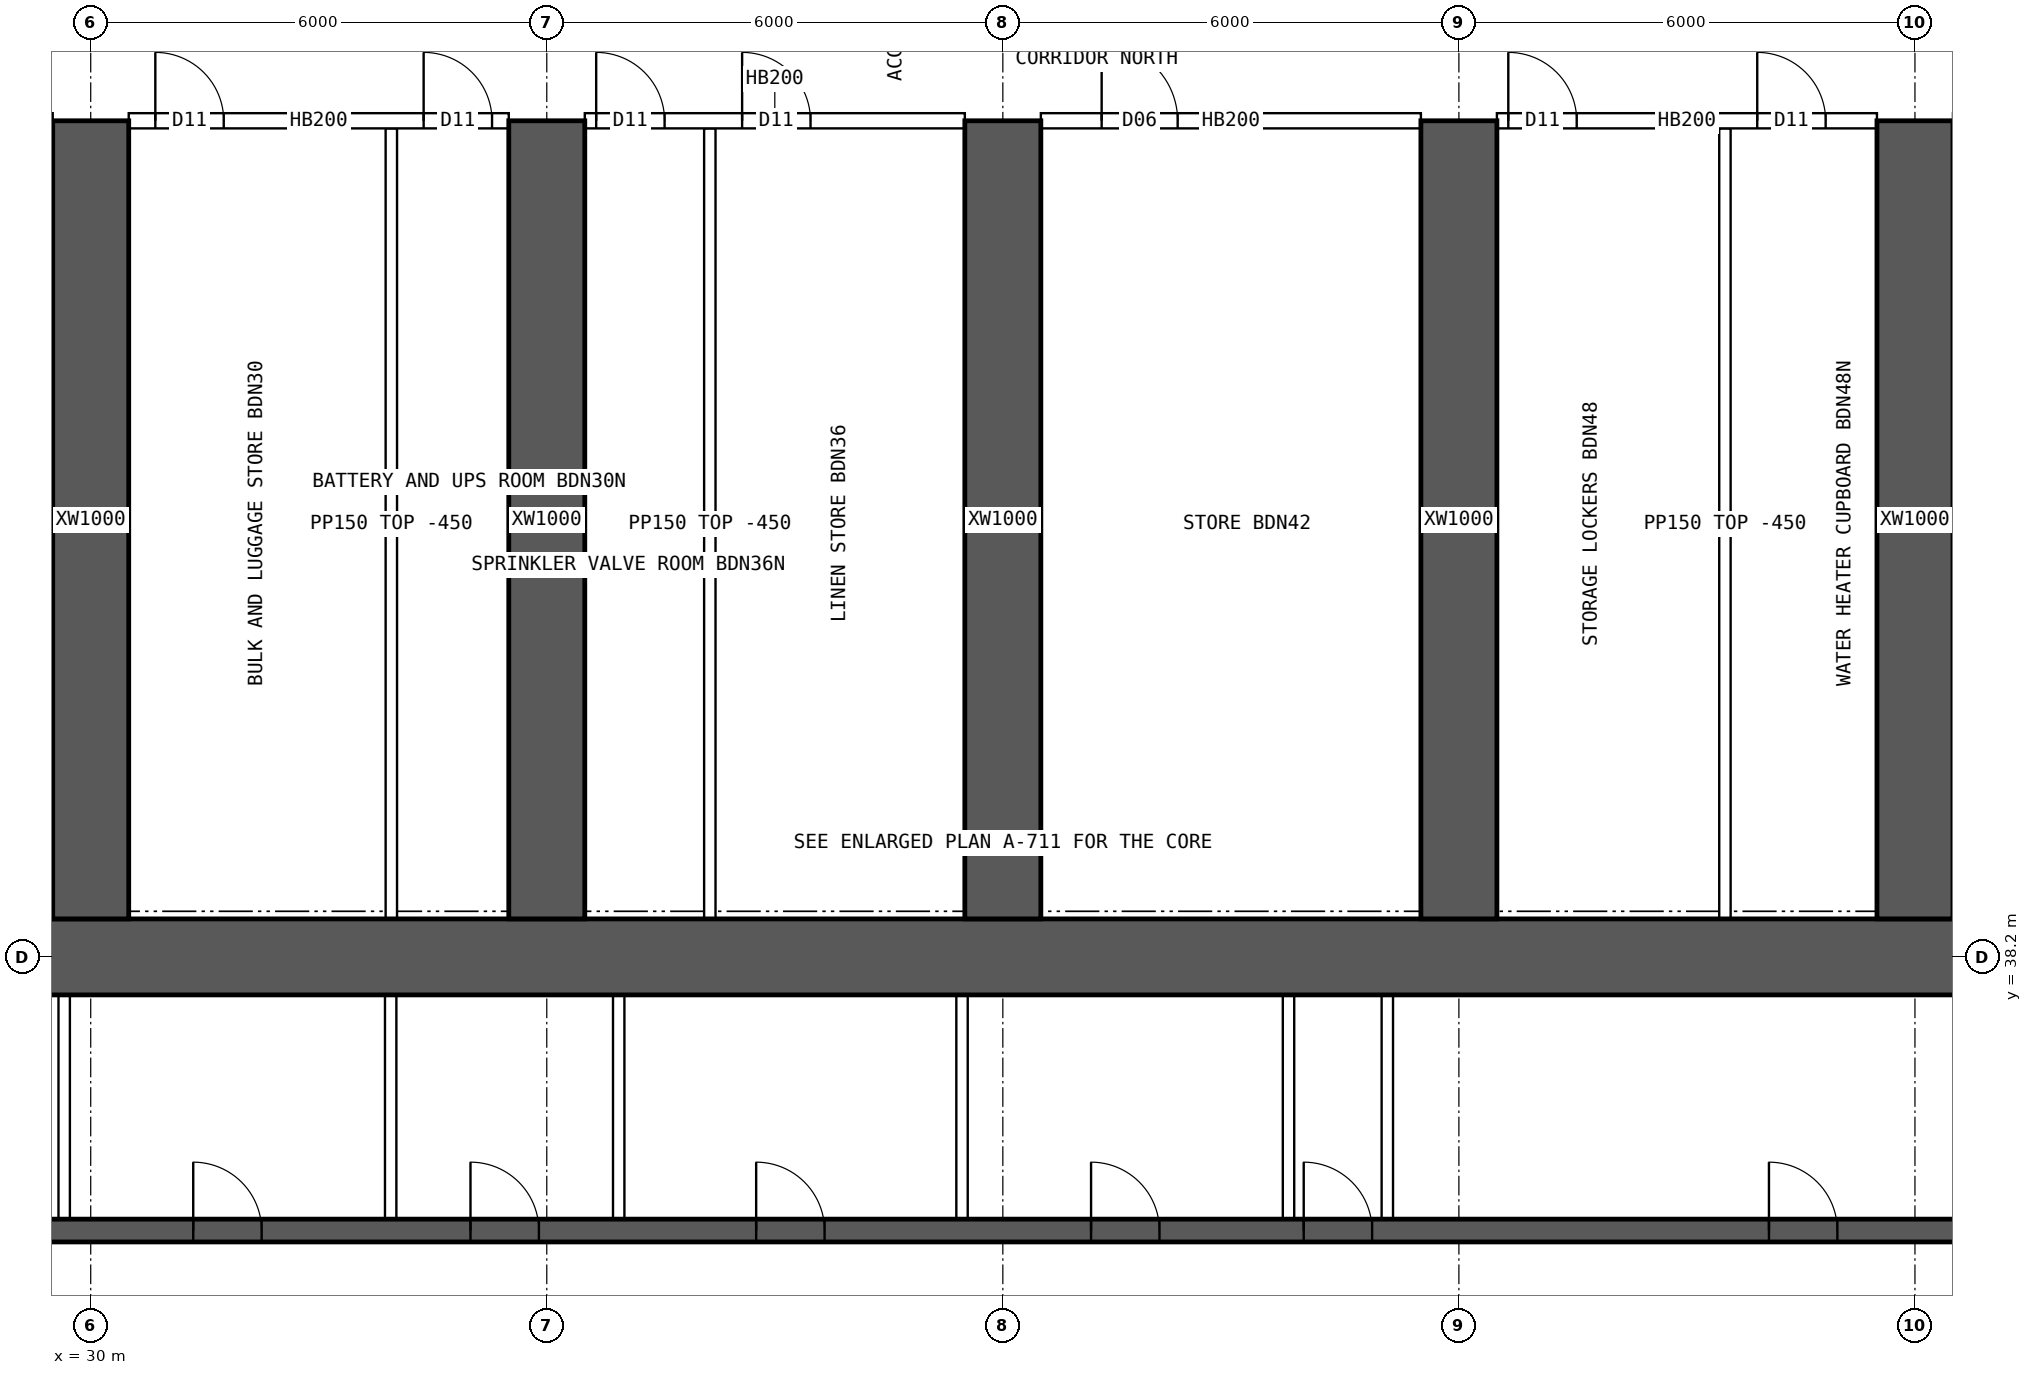
"""IFC4 building model, lengths in metres.
Left out: names, types, materials, properties, quantities, classifications, styles, units other than length and angle.
Written with IfcOpenShell. Run it as: python <this file> out.ifc"""

import sys

from ifc_helpers import new_model, si_unit, direction, frame, frame_2d, origin, place, context, subcontext, project, spatial, rectangle, extrude, element, fill, save


model = new_model("IFC4")
c1 = context("Model", 3, precision=1e-05, world=origin(), true_north=direction((0.0, 1.0)))
c2 = subcontext(c1, "Body", "Model", "MODEL_VIEW")
j1 = project(units=[si_unit("LENGTHUNIT", "METRE"), si_unit("PLANEANGLEUNIT", "RADIAN")], contexts=[c1])
p1 = place(None, origin())
s1 = spatial("IfcSite", under=j1, at=p1, CompositionType="ELEMENT")
p2 = place(p1, origin())
s2 = spatial("IfcBuilding", under=s1, at=p2, CompositionType="ELEMENT")
p3 = place(p2, frame((0.0, 0.0, 35.2)))
s3 = spatial("IfcBuildingStorey", under=s2, at=p3, CompositionType="ELEMENT", Elevation=35.2)
p4 = place(p3, frame((18.0, 38.2, 0.0), z_axis=(0.0, 0.0, 1.0), x_axis=(1.0, 0.0, 0.0)))
e1 = element("IfcWall", 1, at=p4, inside=s3, PredefinedType="SHEAR", context=c2, shape_type="SweptSolid", body=[
    extrude(rectangle(XDim=48.0, YDim=1.0, at=frame_2d((24.0, 0.0))), origin(), (0.0, 0.0, 1.0), 3.75),
])
p5 = place(p3, frame((18.5, 34.6, 0.0), z_axis=(0.0, 0.0, 1.0), x_axis=(1.0, 0.0, 0.0)))
e2 = element("IfcWall", 2, at=p5, inside=s3, PredefinedType="SHEAR", context=c2, shape_type="SweptSolid", body=[
    extrude(rectangle(XDim=47.0, YDim=0.3, at=frame_2d((23.5, 0.0))), origin(), (0.0, 0.0, 1.0), 3.75),
])
p6 = place(p5, frame((0.9, 0.0, 0.0)))
e3 = element("IfcOpeningElement", 3, at=p6, cuts=e2, PredefinedType="OPENING", context=c2, shape_type="SweptSolid", body=[
    extrude(rectangle(XDim=1.1, YDim=2.1, at=frame_2d((0.55, 1.05))), frame((0.0, 0.16, 0.0), z_axis=(0.0, -1.0, 0.0), x_axis=(1.0, 0.0, 0.0)), (0.0, 0.0, 1.0), 0.32),
])
p7 = place(p5, frame((45.0, 0.0, 0.0)))
e4 = element("IfcOpeningElement", 4, at=p7, cuts=e2, PredefinedType="OPENING", context=c2, shape_type="SweptSolid", body=[
    extrude(rectangle(XDim=1.1, YDim=2.1, at=frame_2d((0.55, 1.05))), frame((0.0, 0.16, 0.0), z_axis=(0.0, -1.0, 0.0), x_axis=(1.0, 0.0, 0.0)), (0.0, 0.0, 1.0), 0.32),
])
p8 = place(p5, frame((4.1, 0.0, 0.0)))
e5 = element("IfcOpeningElement", 5, at=p8, cuts=e2, PredefinedType="OPENING", context=c2, shape_type="SweptSolid", body=[
    extrude(rectangle(XDim=0.9, YDim=2.1, at=frame_2d((0.45, 1.05))), frame((0.0, 0.16, 0.0), z_axis=(0.0, -1.0, 0.0), x_axis=(1.0, 0.0, 0.0)), (0.0, 0.0, 1.0), 0.32),
])
p9 = place(p5, frame((42.0, 0.0, 0.0)))
e6 = element("IfcOpeningElement", 6, at=p9, cuts=e2, PredefinedType="OPENING", context=c2, shape_type="SweptSolid", body=[
    extrude(rectangle(XDim=0.9, YDim=2.1, at=frame_2d((0.45, 1.05))), frame((0.0, 0.16, 0.0), z_axis=(0.0, -1.0, 0.0), x_axis=(1.0, 0.0, 0.0)), (0.0, 0.0, 1.0), 0.32),
])
p10 = place(p5, frame((8.875, 0.0, 0.0)))
e7 = element("IfcOpeningElement", 7, at=p10, cuts=e2, PredefinedType="OPENING", context=c2, shape_type="SweptSolid", body=[
    extrude(rectangle(XDim=0.9, YDim=2.1, at=frame_2d((0.45, 1.05))), frame((0.0, 0.16, 0.0), z_axis=(0.0, -1.0, 0.0), x_axis=(1.0, 0.0, 0.0)), (0.0, 0.0, 1.0), 0.32),
])
p11 = place(p5, frame((12.849, 0.0, 0.0)))
e8 = element("IfcOpeningElement", 8, at=p11, cuts=e2, PredefinedType="OPENING", context=c2, shape_type="SweptSolid", body=[
    extrude(rectangle(XDim=0.9, YDim=2.1, at=frame_2d((0.45, 1.05))), frame((0.0, 0.16, 0.0), z_axis=(0.0, -1.0, 0.0), x_axis=(1.0, 0.0, 0.0)), (0.0, 0.0, 1.0), 0.32),
])
p12 = place(p5, frame((16.496, 0.0, 0.0)))
e9 = element("IfcOpeningElement", 9, at=p12, cuts=e2, PredefinedType="OPENING", context=c2, shape_type="SweptSolid", body=[
    extrude(rectangle(XDim=0.9, YDim=2.1, at=frame_2d((0.45, 1.05))), frame((0.0, 0.16, 0.0), z_axis=(0.0, -1.0, 0.0), x_axis=(1.0, 0.0, 0.0)), (0.0, 0.0, 1.0), 0.32),
])
p13 = place(p5, frame((20.255, 0.0, 0.0)))
e10 = element("IfcOpeningElement", 10, at=p13, cuts=e2, PredefinedType="OPENING", context=c2, shape_type="SweptSolid", body=[
    extrude(rectangle(XDim=0.9, YDim=2.1, at=frame_2d((0.45, 1.05))), frame((0.0, 0.16, 0.0), z_axis=(0.0, -1.0, 0.0), x_axis=(1.0, 0.0, 0.0)), (0.0, 0.0, 1.0), 0.32),
])
p14 = place(p5, frame((24.661, 0.0, 0.0)))
e11 = element("IfcOpeningElement", 11, at=p14, cuts=e2, PredefinedType="OPENING", context=c2, shape_type="SweptSolid", body=[
    extrude(rectangle(XDim=0.9, YDim=2.1, at=frame_2d((0.45, 1.05))), frame((0.0, 0.16, 0.0), z_axis=(0.0, -1.0, 0.0), x_axis=(1.0, 0.0, 0.0)), (0.0, 0.0, 1.0), 0.32),
])
p15 = place(p5, frame((27.458, 0.0, 0.0)))
e12 = element("IfcOpeningElement", 12, at=p15, cuts=e2, PredefinedType="OPENING", context=c2, shape_type="SweptSolid", body=[
    extrude(rectangle(XDim=0.9, YDim=2.1, at=frame_2d((0.45, 1.05))), frame((0.0, 0.16, 0.0), z_axis=(0.0, -1.0, 0.0), x_axis=(1.0, 0.0, 0.0)), (0.0, 0.0, 1.0), 0.32),
])
p16 = place(p5, frame((33.579, 0.0, 0.0)))
e13 = element("IfcOpeningElement", 13, at=p16, cuts=e2, PredefinedType="OPENING", context=c2, shape_type="SweptSolid", body=[
    extrude(rectangle(XDim=0.9, YDim=2.1, at=frame_2d((0.45, 1.05))), frame((0.0, 0.16, 0.0), z_axis=(0.0, -1.0, 0.0), x_axis=(1.0, 0.0, 0.0)), (0.0, 0.0, 1.0), 0.32),
])
for number, where, z_axis, x_axis in (
    (14, (30.0, 38.7, 0.0), (0.0, 0.0, 1.0), (0.0, 1.0, 0.0)),
    (15, (36.0, 38.7, 0.0), (0.0, 0.0, 1.0), (0.0, 1.0, 0.0)),
    (16, (42.0, 38.7, 0.0), (0.0, 0.0, 1.0), (0.0, 1.0, 0.0)),
    (17, (48.0, 38.7, 0.0), (0.0, 0.0, 1.0), (0.0, 1.0, 0.0)),
    (18, (54.0, 38.7, 0.0), (0.0, 0.0, 1.0), (0.0, 1.0, 0.0)),
):
    element("IfcWall", number, at=place(p3, frame(where, z_axis=z_axis, x_axis=x_axis)), inside=s3, PredefinedType="SHEAR", context=c2, shape_type="SweptSolid", body=[
        extrude(rectangle(XDim=10.5, YDim=1.0, at=frame_2d((5.25, 0.0))), origin(), (0.0, 0.0, 1.0), 3.75),
    ])
for number, where, z_axis, x_axis in (
    (19, (29.651, 34.75, 0.0), (0.0, 0.0, 1.0), (0.0, 1.0, 0.0)),
    (20, (33.946, 34.75, 0.0), (0.0, 0.0, 1.0), (0.0, 1.0, 0.0)),
    (21, (36.946, 34.75, 0.0), (0.0, 0.0, 1.0), (0.0, 1.0, 0.0)),
    (22, (41.463, 34.75, 0.0), (0.0, 0.0, 1.0), (0.0, 1.0, 0.0)),
    (23, (45.758, 34.75, 0.0), (0.0, 0.0, 1.0), (0.0, 1.0, 0.0)),
    (24, (47.058, 34.75, 0.0), (0.0, 0.0, 1.0), (0.0, 1.0, 0.0)),
):
    element("IfcWall", number, at=place(p3, frame(where, z_axis=z_axis, x_axis=x_axis)), inside=s3, PredefinedType="SOLIDWALL", context=c2, shape_type="SweptSolid", body=[
        extrude(rectangle(XDim=2.95, YDim=0.15, at=frame_2d((1.475, 0.0))), origin(), (0.0, 0.0, 1.0), 3.3),
    ])
p17 = place(p3, frame((30.5, 49.2, 0.0), z_axis=(0.0, 0.0, 1.0), x_axis=(1.0, 0.0, 0.0)))
e25 = element("IfcWall", 25, at=p17, inside=s3, PredefinedType="SOLIDWALL", context=c2, shape_type="SweptSolid", body=[
    extrude(rectangle(XDim=5.0, YDim=0.2, at=frame_2d((2.5, 0.0))), origin(), (0.0, 0.0, 1.0), 3.3),
])
p18 = place(p17, frame((0.35, 0.0, 0.0)))
e26 = element("IfcOpeningElement", 26, at=p18, cuts=e25, PredefinedType="OPENING", context=c2, shape_type="SweptSolid", body=[
    extrude(rectangle(XDim=0.9, YDim=2.1, at=frame_2d((0.45, 1.05))), frame((0.0, 0.11, 0.0), z_axis=(0.0, -1.0, 0.0), x_axis=(1.0, 0.0, 0.0)), (0.0, 0.0, 1.0), 0.22),
])
p19 = place(p17, frame((3.88, 0.0, 0.0)))
e27 = element("IfcOpeningElement", 27, at=p19, cuts=e25, PredefinedType="OPENING", context=c2, shape_type="SweptSolid", body=[
    extrude(rectangle(XDim=0.9, YDim=2.1, at=frame_2d((0.45, 1.05))), frame((0.0, 0.11, 0.0), z_axis=(0.0, -1.0, 0.0), x_axis=(1.0, 0.0, 0.0)), (0.0, 0.0, 1.0), 0.22),
])
p20 = place(p3, frame((36.5, 49.2, 0.0), z_axis=(0.0, 0.0, 1.0), x_axis=(1.0, 0.0, 0.0)))
e28 = element("IfcWall", 28, at=p20, inside=s3, PredefinedType="SOLIDWALL", context=c2, shape_type="SweptSolid", body=[
    extrude(rectangle(XDim=5.0, YDim=0.2, at=frame_2d((2.5, 0.0))), origin(), (0.0, 0.0, 1.0), 3.3),
])
p21 = place(p20, frame((0.15, 0.0, 0.0)))
e29 = element("IfcOpeningElement", 29, at=p21, cuts=e28, PredefinedType="OPENING", context=c2, shape_type="SweptSolid", body=[
    extrude(rectangle(XDim=0.9, YDim=2.1, at=frame_2d((0.45, 1.05))), frame((0.0, 0.11, 0.0), z_axis=(0.0, -1.0, 0.0), x_axis=(1.0, 0.0, 0.0)), (0.0, 0.0, 1.0), 0.22),
])
p22 = place(p20, frame((2.07, 0.0, 0.0)))
e30 = element("IfcOpeningElement", 30, at=p22, cuts=e28, PredefinedType="OPENING", context=c2, shape_type="SweptSolid", body=[
    extrude(rectangle(XDim=0.9, YDim=2.1, at=frame_2d((0.45, 1.05))), frame((0.0, 0.11, 0.0), z_axis=(0.0, -1.0, 0.0), x_axis=(1.0, 0.0, 0.0)), (0.0, 0.0, 1.0), 0.22),
])
p23 = place(p3, frame((42.5, 49.2, 0.0), z_axis=(0.0, 0.0, 1.0), x_axis=(1.0, 0.0, 0.0)))
e31 = element("IfcWall", 31, at=p23, inside=s3, PredefinedType="SOLIDWALL", context=c2, shape_type="SweptSolid", body=[
    extrude(rectangle(XDim=5.0, YDim=0.2, at=frame_2d((2.5, 0.0))), origin(), (0.0, 0.0, 1.0), 3.3),
])
p24 = place(p23, frame((0.8, 0.0, 0.0)))
e32 = element("IfcOpeningElement", 32, at=p24, cuts=e31, PredefinedType="OPENING", context=c2, shape_type="SweptSolid", body=[
    extrude(rectangle(XDim=1.0, YDim=2.1, at=frame_2d((0.5, 1.05))), frame((0.0, 0.11, 0.0), z_axis=(0.0, -1.0, 0.0), x_axis=(1.0, 0.0, 0.0)), (0.0, 0.0, 1.0), 0.22),
])
p25 = place(p3, frame((48.5, 49.2, 0.0), z_axis=(0.0, 0.0, 1.0), x_axis=(1.0, 0.0, 0.0)))
e33 = element("IfcWall", 33, at=p25, inside=s3, PredefinedType="SOLIDWALL", context=c2, shape_type="SweptSolid", body=[
    extrude(rectangle(XDim=5.0, YDim=0.2, at=frame_2d((2.5, 0.0))), origin(), (0.0, 0.0, 1.0), 3.3),
])
p26 = place(p25, frame((0.15, 0.0, 0.0)))
e34 = element("IfcOpeningElement", 34, at=p26, cuts=e33, PredefinedType="OPENING", context=c2, shape_type="SweptSolid", body=[
    extrude(rectangle(XDim=0.9, YDim=2.1, at=frame_2d((0.45, 1.05))), frame((0.0, 0.11, 0.0), z_axis=(0.0, -1.0, 0.0), x_axis=(1.0, 0.0, 0.0)), (0.0, 0.0, 1.0), 0.22),
])
p27 = place(p25, frame((3.425, 0.0, 0.0)))
e35 = element("IfcOpeningElement", 35, at=p27, cuts=e33, PredefinedType="OPENING", context=c2, shape_type="SweptSolid", body=[
    extrude(rectangle(XDim=0.9, YDim=2.1, at=frame_2d((0.45, 1.05))), frame((0.0, 0.11, 0.0), z_axis=(0.0, -1.0, 0.0), x_axis=(1.0, 0.0, 0.0)), (0.0, 0.0, 1.0), 0.22),
])
for number, where, z_axis, x_axis in (
    (36, (33.955, 38.7, 0.0), (0.0, 0.0, 1.0), (0.0, 1.0, 0.0)),
    (37, (38.145, 38.7, 0.0), (0.0, 0.0, 1.0), (0.0, 1.0, 0.0)),
    (38, (51.5, 38.7, 0.0), (0.0, 0.0, 1.0), (0.0, 1.0, 0.0)),
):
    element("IfcWall", number, at=place(p3, frame(where, z_axis=z_axis, x_axis=x_axis)), inside=s3, PredefinedType="PARTITIONING", context=c2, shape_type="SweptSolid", body=[
        extrude(rectangle(XDim=10.4, YDim=0.15, at=frame_2d((5.2, 0.0))), origin(), (0.0, 0.0, 1.0), 3.3),
    ])
p28 = place(p11, origin())
e39 = element("IfcDoor", 39, at=p28, inside=s3, OperationType="SINGLE_SWING_LEFT", PredefinedType="DOOR", context=c2, shape_type="SweptSolid", body=[
    extrude(rectangle(XDim=0.9, YDim=2.1, at=frame_2d((0.45, 1.05))), frame((0.0, 0.025, 0.0), z_axis=(0.0, -1.0, 0.0), x_axis=(1.0, 0.0, 0.0)), (0.0, 0.0, 1.0), 0.05),
])
fill(e8, e39)
p29 = place(p12, origin())
e40 = element("IfcDoor", 40, at=p29, inside=s3, OperationType="SINGLE_SWING_LEFT", PredefinedType="DOOR", context=c2, shape_type="SweptSolid", body=[
    extrude(rectangle(XDim=0.9, YDim=2.1, at=frame_2d((0.45, 1.05))), frame((0.0, 0.025, 0.0), z_axis=(0.0, -1.0, 0.0), x_axis=(1.0, 0.0, 0.0)), (0.0, 0.0, 1.0), 0.05),
])
fill(e9, e40)
p30 = place(p13, origin())
e41 = element("IfcDoor", 41, at=p30, inside=s3, OperationType="SINGLE_SWING_LEFT", PredefinedType="DOOR", context=c2, shape_type="SweptSolid", body=[
    extrude(rectangle(XDim=0.9, YDim=2.1, at=frame_2d((0.45, 1.05))), frame((0.0, 0.025, 0.0), z_axis=(0.0, -1.0, 0.0), x_axis=(1.0, 0.0, 0.0)), (0.0, 0.0, 1.0), 0.05),
])
fill(e10, e41)
p31 = place(p14, origin())
e42 = element("IfcDoor", 42, at=p31, inside=s3, OperationType="SINGLE_SWING_LEFT", PredefinedType="DOOR", context=c2, shape_type="SweptSolid", body=[
    extrude(rectangle(XDim=0.9, YDim=2.1, at=frame_2d((0.45, 1.05))), frame((0.0, 0.025, 0.0), z_axis=(0.0, -1.0, 0.0), x_axis=(1.0, 0.0, 0.0)), (0.0, 0.0, 1.0), 0.05),
])
fill(e11, e42)
p32 = place(p15, origin())
e43 = element("IfcDoor", 43, at=p32, inside=s3, OperationType="SINGLE_SWING_LEFT", PredefinedType="DOOR", context=c2, shape_type="SweptSolid", body=[
    extrude(rectangle(XDim=0.9, YDim=2.1, at=frame_2d((0.45, 1.05))), frame((0.0, 0.025, 0.0), z_axis=(0.0, -1.0, 0.0), x_axis=(1.0, 0.0, 0.0)), (0.0, 0.0, 1.0), 0.05),
])
fill(e12, e43)
p33 = place(p16, origin())
e44 = element("IfcDoor", 44, at=p33, inside=s3, OperationType="SINGLE_SWING_LEFT", PredefinedType="DOOR", context=c2, shape_type="SweptSolid", body=[
    extrude(rectangle(XDim=0.9, YDim=2.1, at=frame_2d((0.45, 1.05))), frame((0.0, 0.025, 0.0), z_axis=(0.0, -1.0, 0.0), x_axis=(1.0, 0.0, 0.0)), (0.0, 0.0, 1.0), 0.05),
])
fill(e13, e44)
p34 = place(p18, origin())
e45 = element("IfcDoor", 45, at=p34, inside=s3, OperationType="SINGLE_SWING_LEFT", PredefinedType="DOOR", context=c2, shape_type="SweptSolid", body=[
    extrude(rectangle(XDim=0.9, YDim=2.1, at=frame_2d((0.45, 1.05))), frame((0.0, 0.025, 0.0), z_axis=(0.0, -1.0, 0.0), x_axis=(1.0, 0.0, 0.0)), (0.0, 0.0, 1.0), 0.05),
])
fill(e26, e45)
p35 = place(p19, origin())
e46 = element("IfcDoor", 46, at=p35, inside=s3, OperationType="SINGLE_SWING_LEFT", PredefinedType="DOOR", context=c2, shape_type="SweptSolid", body=[
    extrude(rectangle(XDim=0.9, YDim=2.1, at=frame_2d((0.45, 1.05))), frame((0.0, 0.025, 0.0), z_axis=(0.0, -1.0, 0.0), x_axis=(1.0, 0.0, 0.0)), (0.0, 0.0, 1.0), 0.05),
])
fill(e27, e46)
p36 = place(p21, origin())
e47 = element("IfcDoor", 47, at=p36, inside=s3, OperationType="SINGLE_SWING_LEFT", PredefinedType="DOOR", context=c2, shape_type="SweptSolid", body=[
    extrude(rectangle(XDim=0.9, YDim=2.1, at=frame_2d((0.45, 1.05))), frame((0.0, 0.025, 0.0), z_axis=(0.0, -1.0, 0.0), x_axis=(1.0, 0.0, 0.0)), (0.0, 0.0, 1.0), 0.05),
])
fill(e29, e47)
p37 = place(p22, origin())
e48 = element("IfcDoor", 48, at=p37, inside=s3, OperationType="SINGLE_SWING_LEFT", PredefinedType="DOOR", context=c2, shape_type="SweptSolid", body=[
    extrude(rectangle(XDim=0.9, YDim=2.1, at=frame_2d((0.45, 1.05))), frame((0.0, 0.025, 0.0), z_axis=(0.0, -1.0, 0.0), x_axis=(1.0, 0.0, 0.0)), (0.0, 0.0, 1.0), 0.05),
])
fill(e30, e48)
p38 = place(p24, origin())
e49 = element("IfcDoor", 49, at=p38, inside=s3, OperationType="SINGLE_SWING_LEFT", PredefinedType="DOOR", context=c2, shape_type="SweptSolid", body=[
    extrude(rectangle(XDim=1.0, YDim=2.1, at=frame_2d((0.5, 1.05))), frame((0.0, 0.025, 0.0), z_axis=(0.0, -1.0, 0.0), x_axis=(1.0, 0.0, 0.0)), (0.0, 0.0, 1.0), 0.05),
])
fill(e32, e49)
p39 = place(p26, origin())
e50 = element("IfcDoor", 50, at=p39, inside=s3, OperationType="SINGLE_SWING_LEFT", PredefinedType="DOOR", context=c2, shape_type="SweptSolid", body=[
    extrude(rectangle(XDim=0.9, YDim=2.1, at=frame_2d((0.45, 1.05))), frame((0.0, 0.025, 0.0), z_axis=(0.0, -1.0, 0.0), x_axis=(1.0, 0.0, 0.0)), (0.0, 0.0, 1.0), 0.05),
])
fill(e34, e50)
p40 = place(p27, origin())
e51 = element("IfcDoor", 51, at=p40, inside=s3, OperationType="SINGLE_SWING_LEFT", PredefinedType="DOOR", context=c2, shape_type="SweptSolid", body=[
    extrude(rectangle(XDim=0.9, YDim=2.1, at=frame_2d((0.45, 1.05))), frame((0.0, 0.025, 0.0), z_axis=(0.0, -1.0, 0.0), x_axis=(1.0, 0.0, 0.0)), (0.0, 0.0, 1.0), 0.05),
])
fill(e35, e51)
save(model, sys.argv[1])
